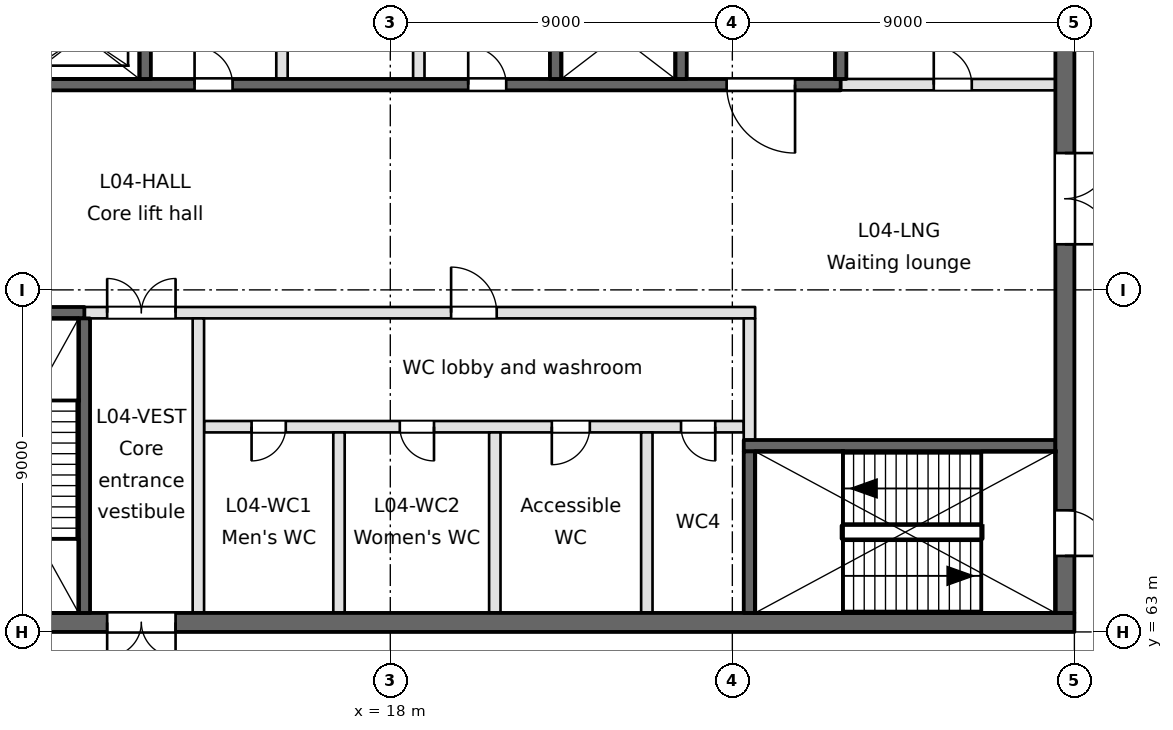
"""IFC4 building model, lengths in metres.
Left out: names, types, materials, properties, quantities, classifications, styles, units other than length and angle.
Written with IfcOpenShell. Run it as: python <this file> out.ifc"""

import sys

from ifc_helpers import new_model, si_unit, direction, frame, frame_2d, origin, place, context, subcontext, project, spatial, rectangle, extrude, element, fill, save


model = new_model("IFC4")
c1 = context("Model", 3, precision=1e-05, world=origin(), true_north=direction((0.0, 1.0)))
c2 = subcontext(c1, "Body", "Model", "MODEL_VIEW")
j1 = project(units=[si_unit("LENGTHUNIT", "METRE"), si_unit("PLANEANGLEUNIT", "RADIAN")], contexts=[c1])
p1 = place(None, origin())
s1 = spatial("IfcSite", under=j1, at=p1, CompositionType="ELEMENT")
p2 = place(p1, origin())
s2 = spatial("IfcBuilding", under=s1, at=p2, CompositionType="ELEMENT")
p3 = place(p2, frame((0.0, 0.0, 21.6)))
s3 = spatial("IfcBuildingStorey", under=s2, at=p3, CompositionType="ELEMENT", Elevation=21.6)
p4 = place(p3, frame((0.9, 63.25, -0.35), z_axis=(0.0, 0.0, 1.0), x_axis=(1.0, 0.0, 0.0)))
e1 = element("IfcWall", 1, at=p4, inside=s3, PredefinedType="SOLIDWALL", context=c2, shape_type="SweptSolid", body=[
    extrude(rectangle(XDim=35.1, YDim=0.5, at=frame_2d((17.55, 0.0))), origin(), (0.0, 0.0, 1.0), 4.8),
])
p5 = place(p4, frame((9.65, 0.0, 0.35)))
e2 = element("IfcOpeningElement", 2, at=p5, cuts=e1, PredefinedType="OPENING", context=c2, shape_type="SweptSolid", body=[
    extrude(rectangle(XDim=1.8, YDim=2.1, at=frame_2d((0.9, 1.05))), frame((0.0, 0.25, 0.0), z_axis=(0.0, -1.0, 0.0), x_axis=(1.0, 0.0, 0.0)), (0.0, 0.0, 1.0), 0.5),
])
p6 = place(p4, frame((1.55, 0.0, 0.35)))
e3 = element("IfcOpeningElement", 3, at=p6, cuts=e1, PredefinedType="OPENING", context=c2, shape_type="SweptSolid", body=[
    extrude(rectangle(XDim=1.2, YDim=2.1, at=frame_2d((0.6, 1.05))), frame((0.0, 0.25, 0.0), z_axis=(0.0, -1.0, 0.0), x_axis=(1.0, 0.0, 0.0)), (0.0, 0.0, 1.0), 0.5),
])
p7 = place(p4, frame((6.15, 0.0, 0.35)))
e4 = element("IfcOpeningElement", 4, at=p7, cuts=e1, PredefinedType="OPENING", context=c2, shape_type="SweptSolid", body=[
    extrude(rectangle(XDim=1.2, YDim=2.1, at=frame_2d((0.6, 1.05))), frame((0.0, 0.25, 0.0), z_axis=(0.0, -1.0, 0.0), x_axis=(1.0, 0.0, 0.0)), (0.0, 0.0, 1.0), 0.5),
])
p8 = place(p3, frame((27.3, 67.9, -0.35), z_axis=(0.0, 0.0, 1.0), x_axis=(1.0, 0.0, 0.0)))
e5 = element("IfcWall", 5, at=p8, inside=s3, PredefinedType="SOLIDWALL", context=c2, shape_type="SweptSolid", body=[
    extrude(rectangle(XDim=8.2, YDim=0.3, at=frame_2d((4.1, 0.0))), origin(), (0.0, 0.0, 1.0), 4.8),
])
p9 = place(p3, frame((13.1, 68.4, 0.0), z_axis=(0.0, 0.0, 1.0), x_axis=(1.0, 0.0, 0.0)))
e6 = element("IfcWall", 6, at=p9, inside=s3, PredefinedType="PARTITIONING", context=c2, shape_type="SweptSolid", body=[
    extrude(rectangle(XDim=14.2, YDim=0.3, at=frame_2d((7.1, 0.0))), origin(), (0.0, 0.0, 1.0), 4.45),
])
p10 = place(p9, frame((1.25, 0.0, 0.0)))
e7 = element("IfcOpeningElement", 7, at=p10, cuts=e6, PredefinedType="OPENING", context=c2, shape_type="SweptSolid", body=[
    extrude(rectangle(XDim=0.9, YDim=2.1, at=frame_2d((0.45, 1.05))), frame((0.0, 0.15, 0.0), z_axis=(0.0, -1.0, 0.0), x_axis=(1.0, 0.0, 0.0)), (0.0, 0.0, 1.0), 0.3),
])
p11 = place(p9, frame((5.15, 0.0, 0.0)))
e8 = element("IfcOpeningElement", 8, at=p11, cuts=e6, PredefinedType="OPENING", context=c2, shape_type="SweptSolid", body=[
    extrude(rectangle(XDim=0.9, YDim=2.1, at=frame_2d((0.45, 1.05))), frame((0.0, 0.15, 0.0), z_axis=(0.0, -1.0, 0.0), x_axis=(1.0, 0.0, 0.0)), (0.0, 0.0, 1.0), 0.3),
])
p12 = place(p9, frame((9.15, 0.0, 0.0)))
e9 = element("IfcOpeningElement", 9, at=p12, cuts=e6, PredefinedType="OPENING", context=c2, shape_type="SweptSolid", body=[
    extrude(rectangle(XDim=1.0, YDim=2.1, at=frame_2d((0.5, 1.05))), frame((0.0, 0.15, 0.0), z_axis=(0.0, -1.0, 0.0), x_axis=(1.0, 0.0, 0.0)), (0.0, 0.0, 1.0), 0.3),
])
p13 = place(p9, frame((12.55, 0.0, 0.0)))
e10 = element("IfcOpeningElement", 10, at=p13, cuts=e6, PredefinedType="OPENING", context=c2, shape_type="SweptSolid", body=[
    extrude(rectangle(XDim=0.9, YDim=2.1, at=frame_2d((0.45, 1.05))), frame((0.0, 0.15, 0.0), z_axis=(0.0, -1.0, 0.0), x_axis=(1.0, 0.0, 0.0)), (0.0, 0.0, 1.0), 0.3),
])
p14 = place(p3, frame((0.9, 71.4, -0.35), z_axis=(0.0, 0.0, 1.0), x_axis=(1.0, 0.0, 0.0)))
e11 = element("IfcWall", 11, at=p14, inside=s3, PredefinedType="SOLIDWALL", context=c2, shape_type="SweptSolid", body=[
    extrude(rectangle(XDim=9.05, YDim=0.3, at=frame_2d((4.525, 0.0))), origin(), (0.0, 0.0, 1.0), 4.8),
])
p15 = place(p3, frame((9.95, 71.4, 0.0), z_axis=(0.0, 0.0, 1.0), x_axis=(1.0, 0.0, 0.0)))
e12 = element("IfcWall", 12, at=p15, inside=s3, PredefinedType="PARTITIONING", context=c2, shape_type="SweptSolid", body=[
    extrude(rectangle(XDim=17.65, YDim=0.3, at=frame_2d((8.825, 0.0))), origin(), (0.0, 0.0, 1.0), 4.45),
])
p16 = place(p15, frame((0.6, 0.0, 0.0)))
e13 = element("IfcOpeningElement", 13, at=p16, cuts=e12, PredefinedType="OPENING", context=c2, shape_type="SweptSolid", body=[
    extrude(rectangle(XDim=1.8, YDim=2.1, at=frame_2d((0.9, 1.05))), frame((0.0, 0.15, 0.0), z_axis=(0.0, -1.0, 0.0), x_axis=(1.0, 0.0, 0.0)), (0.0, 0.0, 1.0), 0.3),
])
p17 = place(p15, frame((9.65, 0.0, 0.0)))
e14 = element("IfcOpeningElement", 14, at=p17, cuts=e12, PredefinedType="OPENING", context=c2, shape_type="SweptSolid", body=[
    extrude(rectangle(XDim=1.2, YDim=2.1, at=frame_2d((0.6, 1.05))), frame((0.0, 0.15, 0.0), z_axis=(0.0, -1.0, 0.0), x_axis=(1.0, 0.0, 0.0)), (0.0, 0.0, 1.0), 0.3),
])
p18 = place(p3, frame((0.9, 77.4, -0.35), z_axis=(0.0, 0.0, 1.0), x_axis=(1.0, 0.0, 0.0)))
e15 = element("IfcWall", 15, at=p18, inside=s3, PredefinedType="SOLIDWALL", context=c2, shape_type="SweptSolid", body=[
    extrude(rectangle(XDim=28.95, YDim=0.3, at=frame_2d((14.475, 0.0))), origin(), (0.0, 0.0, 1.0), 4.8),
])
p19 = place(p18, frame((4.35, 0.0, 0.35)))
e16 = element("IfcOpeningElement", 16, at=p19, cuts=e15, PredefinedType="OPENING", context=c2, shape_type="SweptSolid", body=[
    extrude(rectangle(XDim=1.8, YDim=2.1, at=frame_2d((0.9, 1.05))), frame((0.0, 0.15, 0.0), z_axis=(0.0, -1.0, 0.0), x_axis=(1.0, 0.0, 0.0)), (0.0, 0.0, 1.0), 0.3),
])
p20 = place(p18, frame((25.95, 0.0, 0.35)))
e17 = element("IfcOpeningElement", 17, at=p20, cuts=e15, PredefinedType="OPENING", context=c2, shape_type="SweptSolid", body=[
    extrude(rectangle(XDim=1.8, YDim=2.1, at=frame_2d((0.9, 1.05))), frame((0.0, 0.15, 0.0), z_axis=(0.0, -1.0, 0.0), x_axis=(1.0, 0.0, 0.0)), (0.0, 0.0, 1.0), 0.3),
])
p21 = place(p18, frame((11.95, 0.0, 0.35)))
e18 = element("IfcOpeningElement", 18, at=p21, cuts=e15, PredefinedType="OPENING", context=c2, shape_type="SweptSolid", body=[
    extrude(rectangle(XDim=1.0, YDim=2.1, at=frame_2d((0.5, 1.05))), frame((0.0, 0.15, 0.0), z_axis=(0.0, -1.0, 0.0), x_axis=(1.0, 0.0, 0.0)), (0.0, 0.0, 1.0), 0.3),
])
p22 = place(p18, frame((19.15, 0.0, 0.35)))
e19 = element("IfcOpeningElement", 19, at=p22, cuts=e15, PredefinedType="OPENING", context=c2, shape_type="SweptSolid", body=[
    extrude(rectangle(XDim=1.0, YDim=2.1, at=frame_2d((0.5, 1.05))), frame((0.0, 0.15, 0.0), z_axis=(0.0, -1.0, 0.0), x_axis=(1.0, 0.0, 0.0)), (0.0, 0.0, 1.0), 0.3),
])
p23 = place(p3, frame((29.85, 77.4, 0.0), z_axis=(0.0, 0.0, 1.0), x_axis=(1.0, 0.0, 0.0)))
e20 = element("IfcWall", 20, at=p23, inside=s3, PredefinedType="PARTITIONING", context=c2, shape_type="SweptSolid", body=[
    extrude(rectangle(XDim=5.65, YDim=0.3, at=frame_2d((2.825, 0.0))), origin(), (0.0, 0.0, 1.0), 4.45),
])
p24 = place(p23, frame((2.45, 0.0, 0.0)))
e21 = element("IfcOpeningElement", 21, at=p24, cuts=e20, PredefinedType="OPENING", context=c2, shape_type="SweptSolid", body=[
    extrude(rectangle(XDim=1.0, YDim=2.1, at=frame_2d((0.5, 1.05))), frame((0.0, 0.15, 0.0), z_axis=(0.0, -1.0, 0.0), x_axis=(1.0, 0.0, 0.0)), (0.0, 0.0, 1.0), 0.3),
])
p25 = place(p3, frame((9.95, 63.5, -0.35), z_axis=(0.0, 0.0, 1.0), x_axis=(0.0, 1.0, 0.0)))
e22 = element("IfcWall", 22, at=p25, inside=s3, PredefinedType="SOLIDWALL", context=c2, shape_type="SweptSolid", body=[
    extrude(rectangle(XDim=7.75, YDim=0.3, at=frame_2d((3.875, 0.0))), origin(), (0.0, 0.0, 1.0), 4.8),
])
p26 = place(p3, frame((11.55, 77.55, -0.35), z_axis=(0.0, 0.0, 1.0), x_axis=(0.0, 1.0, 0.0)))
e23 = element("IfcWall", 23, at=p26, inside=s3, PredefinedType="SOLIDWALL", context=c2, shape_type="SweptSolid", body=[
    extrude(rectangle(XDim=10.1, YDim=0.3, at=frame_2d((5.05, 0.0))), origin(), (0.0, 0.0, 1.0), 4.8),
])
p27 = place(p3, frame((12.95, 63.5, 0.0), z_axis=(0.0, 0.0, 1.0), x_axis=(0.0, 1.0, 0.0)))
e24 = element("IfcWall", 24, at=p27, inside=s3, PredefinedType="PARTITIONING", context=c2, shape_type="SweptSolid", body=[
    extrude(rectangle(XDim=7.75, YDim=0.3, at=frame_2d((3.875, 0.0))), origin(), (0.0, 0.0, 1.0), 4.45),
])
p28 = place(p3, frame((15.15, 77.55, 0.0), z_axis=(0.0, 0.0, 1.0), x_axis=(0.0, 1.0, 0.0)))
e25 = element("IfcWall", 25, at=p28, inside=s3, PredefinedType="PARTITIONING", context=c2, shape_type="SweptSolid", body=[
    extrude(rectangle(XDim=12.95, YDim=0.3, at=frame_2d((6.475, 0.0))), origin(), (0.0, 0.0, 1.0), 4.45),
])
p29 = place(p3, frame((16.65, 63.5, 0.0), z_axis=(0.0, 0.0, 1.0), x_axis=(0.0, 1.0, 0.0)))
e26 = element("IfcWall", 26, at=p29, inside=s3, PredefinedType="PARTITIONING", context=c2, shape_type="SweptSolid", body=[
    extrude(rectangle(XDim=4.75, YDim=0.3, at=frame_2d((2.375, 0.0))), origin(), (0.0, 0.0, 1.0), 4.45),
])
p30 = place(p3, frame((18.75, 77.55, 0.0), z_axis=(0.0, 0.0, 1.0), x_axis=(0.0, 1.0, 0.0)))
e27 = element("IfcWall", 27, at=p30, inside=s3, PredefinedType="PARTITIONING", context=c2, shape_type="SweptSolid", body=[
    extrude(rectangle(XDim=12.95, YDim=0.3, at=frame_2d((6.475, 0.0))), origin(), (0.0, 0.0, 1.0), 4.45),
])
p31 = place(p3, frame((20.75, 63.5, 0.0), z_axis=(0.0, 0.0, 1.0), x_axis=(0.0, 1.0, 0.0)))
e28 = element("IfcWall", 28, at=p31, inside=s3, PredefinedType="PARTITIONING", context=c2, shape_type="SweptSolid", body=[
    extrude(rectangle(XDim=4.75, YDim=0.3, at=frame_2d((2.375, 0.0))), origin(), (0.0, 0.0, 1.0), 4.45),
])
p32 = place(p3, frame((22.35, 77.55, -0.35), z_axis=(0.0, 0.0, 1.0), x_axis=(0.0, 1.0, 0.0)))
e29 = element("IfcWall", 29, at=p32, inside=s3, PredefinedType="SOLIDWALL", context=c2, shape_type="SweptSolid", body=[
    extrude(rectangle(XDim=10.1, YDim=0.3, at=frame_2d((5.05, 0.0))), origin(), (0.0, 0.0, 1.0), 4.8),
])
p33 = place(p3, frame((24.75, 63.5, 0.0), z_axis=(0.0, 0.0, 1.0), x_axis=(0.0, 1.0, 0.0)))
e30 = element("IfcWall", 30, at=p33, inside=s3, PredefinedType="PARTITIONING", context=c2, shape_type="SweptSolid", body=[
    extrude(rectangle(XDim=4.75, YDim=0.3, at=frame_2d((2.375, 0.0))), origin(), (0.0, 0.0, 1.0), 4.45),
])
p34 = place(p3, frame((25.65, 77.55, -0.35), z_axis=(0.0, 0.0, 1.0), x_axis=(0.0, 1.0, 0.0)))
e31 = element("IfcWall", 31, at=p34, inside=s3, PredefinedType="SOLIDWALL", context=c2, shape_type="SweptSolid", body=[
    extrude(rectangle(XDim=10.1, YDim=0.3, at=frame_2d((5.05, 0.0))), origin(), (0.0, 0.0, 1.0), 4.8),
])
p35 = place(p3, frame((27.45, 63.5, -0.35), z_axis=(0.0, 0.0, 1.0), x_axis=(0.0, 1.0, 0.0)))
e32 = element("IfcWall", 32, at=p35, inside=s3, PredefinedType="SOLIDWALL", context=c2, shape_type="SweptSolid", body=[
    extrude(rectangle(XDim=4.25, YDim=0.3, at=frame_2d((2.125, 0.0))), origin(), (0.0, 0.0, 1.0), 4.8),
])
p36 = place(p3, frame((27.45, 68.05, 0.0), z_axis=(0.0, 0.0, 1.0), x_axis=(0.0, 1.0, 0.0)))
e33 = element("IfcWall", 33, at=p36, inside=s3, PredefinedType="PARTITIONING", context=c2, shape_type="SweptSolid", body=[
    extrude(rectangle(XDim=3.2, YDim=0.3, at=frame_2d((1.6, 0.0))), origin(), (0.0, 0.0, 1.0), 4.45),
])
p37 = place(p3, frame((29.85, 77.55, -0.35), z_axis=(0.0, 0.0, 1.0), x_axis=(0.0, 1.0, 0.0)))
e34 = element("IfcWall", 34, at=p37, inside=s3, PredefinedType="SOLIDWALL", context=c2, shape_type="SweptSolid", body=[
    extrude(rectangle(XDim=10.1, YDim=0.3, at=frame_2d((5.05, 0.0))), origin(), (0.0, 0.0, 1.0), 4.8),
])
p38 = place(p3, frame((35.75, 63.5, -0.35), z_axis=(0.0, 0.0, 1.0), x_axis=(0.0, 1.0, 0.0)))
e35 = element("IfcWall", 35, at=p38, inside=s3, PredefinedType="SOLIDWALL", context=c2, shape_type="SweptSolid", body=[
    extrude(rectangle(XDim=34.6, YDim=0.5, at=frame_2d((17.3, 0.0))), origin(), (0.0, 0.0, 1.0), 4.8),
])
p39 = place(p38, frame((9.7, 0.0, 0.35)))
e36 = element("IfcOpeningElement", 36, at=p39, cuts=e35, PredefinedType="OPENING", context=c2, shape_type="SweptSolid", body=[
    extrude(rectangle(XDim=2.4, YDim=2.1, at=frame_2d((1.2, 1.05))), frame((0.0, 0.25, 0.0), z_axis=(0.0, -1.0, 0.0), x_axis=(1.0, 0.0, 0.0)), (0.0, 0.0, 1.0), 0.5),
])
p40 = place(p38, frame((27.9, 0.0, 0.35)))
e37 = element("IfcOpeningElement", 37, at=p40, cuts=e35, PredefinedType="OPENING", context=c2, shape_type="SweptSolid", body=[
    extrude(rectangle(XDim=1.5, YDim=2.1, at=frame_2d((0.75, 1.05))), frame((0.0, 0.25, 0.0), z_axis=(0.0, -1.0, 0.0), x_axis=(1.0, 0.0, 0.0)), (0.0, 0.0, 1.0), 0.5),
])
p41 = place(p38, frame((1.5, 0.0, 0.35)))
e38 = element("IfcOpeningElement", 38, at=p41, cuts=e35, PredefinedType="OPENING", context=c2, shape_type="SweptSolid", body=[
    extrude(rectangle(XDim=1.2, YDim=2.1, at=frame_2d((0.6, 1.05))), frame((0.0, 0.25, 0.0), z_axis=(0.0, -1.0, 0.0), x_axis=(1.0, 0.0, 0.0)), (0.0, 0.0, 1.0), 0.5),
])
p42 = place(p20, frame((1.8, 0.0, 0.0), z_axis=(0.0, 0.0, 1.0), x_axis=(-1.0, 0.0, 0.0)))
e39 = element("IfcDoor", 39, at=p42, inside=s3, OperationType="SINGLE_SWING_LEFT", PredefinedType="DOOR", context=c2, shape_type="SweptSolid", body=[
    extrude(rectangle(XDim=1.8, YDim=2.1, at=frame_2d((0.9, 1.05))), frame((0.0, 0.025, 0.0), z_axis=(0.0, -1.0, 0.0), x_axis=(1.0, 0.0, 0.0)), (0.0, 0.0, 1.0), 0.05),
])
fill(e17, e39)
p43 = place(p39, frame((2.4, 0.0, 0.0), z_axis=(0.0, 0.0, 1.0), x_axis=(-1.0, 0.0, 0.0)))
e40 = element("IfcDoor", 40, at=p43, inside=s3, OperationType="DOUBLE_DOOR_SINGLE_SWING", PredefinedType="DOOR", context=c2, shape_type="SweptSolid", body=[
    extrude(rectangle(XDim=2.4, YDim=2.1, at=frame_2d((1.2, 1.05))), frame((0.0, 0.025, 0.0), z_axis=(0.0, -1.0, 0.0), x_axis=(1.0, 0.0, 0.0)), (0.0, 0.0, 1.0), 0.05),
])
fill(e36, e40)
p44 = place(p5, frame((1.8, 0.0, 0.0), z_axis=(0.0, 0.0, 1.0), x_axis=(-1.0, 0.0, 0.0)))
e41 = element("IfcDoor", 41, at=p44, inside=s3, OperationType="DOUBLE_DOOR_SINGLE_SWING", PredefinedType="DOOR", context=c2, shape_type="SweptSolid", body=[
    extrude(rectangle(XDim=1.8, YDim=2.1, at=frame_2d((0.9, 1.05))), frame((0.0, 0.025, 0.0), z_axis=(0.0, -1.0, 0.0), x_axis=(1.0, 0.0, 0.0)), (0.0, 0.0, 1.0), 0.05),
])
fill(e2, e41)
p45 = place(p16, origin())
e42 = element("IfcDoor", 42, at=p45, inside=s3, OperationType="DOUBLE_DOOR_SINGLE_SWING", PredefinedType="DOOR", context=c2, shape_type="SweptSolid", body=[
    extrude(rectangle(XDim=1.8, YDim=2.1, at=frame_2d((0.9, 1.05))), frame((0.0, 0.025, 0.0), z_axis=(0.0, -1.0, 0.0), x_axis=(1.0, 0.0, 0.0)), (0.0, 0.0, 1.0), 0.05),
])
fill(e13, e42)
p46 = place(p10, frame((0.9, 0.0, 0.0), z_axis=(0.0, 0.0, 1.0), x_axis=(-1.0, 0.0, 0.0)))
e43 = element("IfcDoor", 43, at=p46, inside=s3, OperationType="SINGLE_SWING_RIGHT", PredefinedType="DOOR", context=c2, shape_type="SweptSolid", body=[
    extrude(rectangle(XDim=0.9, YDim=2.1, at=frame_2d((0.45, 1.05))), frame((0.0, 0.025, 0.0), z_axis=(0.0, -1.0, 0.0), x_axis=(1.0, 0.0, 0.0)), (0.0, 0.0, 1.0), 0.05),
])
fill(e7, e43)
p47 = place(p11, frame((0.9, 0.0, 0.0), z_axis=(0.0, 0.0, 1.0), x_axis=(-1.0, 0.0, 0.0)))
e44 = element("IfcDoor", 44, at=p47, inside=s3, OperationType="SINGLE_SWING_LEFT", PredefinedType="DOOR", context=c2, shape_type="SweptSolid", body=[
    extrude(rectangle(XDim=0.9, YDim=2.1, at=frame_2d((0.45, 1.05))), frame((0.0, 0.025, 0.0), z_axis=(0.0, -1.0, 0.0), x_axis=(1.0, 0.0, 0.0)), (0.0, 0.0, 1.0), 0.05),
])
fill(e8, e44)
p48 = place(p12, frame((1.0, 0.0, 0.0), z_axis=(0.0, 0.0, 1.0), x_axis=(-1.0, 0.0, 0.0)))
e45 = element("IfcDoor", 45, at=p48, inside=s3, OperationType="SINGLE_SWING_RIGHT", PredefinedType="DOOR", context=c2, shape_type="SweptSolid", body=[
    extrude(rectangle(XDim=1.0, YDim=2.1, at=frame_2d((0.5, 1.05))), frame((0.0, 0.025, 0.0), z_axis=(0.0, -1.0, 0.0), x_axis=(1.0, 0.0, 0.0)), (0.0, 0.0, 1.0), 0.05),
])
fill(e9, e45)
p49 = place(p13, frame((0.9, 0.0, 0.0), z_axis=(0.0, 0.0, 1.0), x_axis=(-1.0, 0.0, 0.0)))
e46 = element("IfcDoor", 46, at=p49, inside=s3, OperationType="SINGLE_SWING_LEFT", PredefinedType="DOOR", context=c2, shape_type="SweptSolid", body=[
    extrude(rectangle(XDim=0.9, YDim=2.1, at=frame_2d((0.45, 1.05))), frame((0.0, 0.025, 0.0), z_axis=(0.0, -1.0, 0.0), x_axis=(1.0, 0.0, 0.0)), (0.0, 0.0, 1.0), 0.05),
])
fill(e10, e46)
p50 = place(p17, origin())
e47 = element("IfcDoor", 47, at=p50, inside=s3, OperationType="SINGLE_SWING_LEFT", PredefinedType="DOOR", context=c2, shape_type="SweptSolid", body=[
    extrude(rectangle(XDim=1.2, YDim=2.1, at=frame_2d((0.6, 1.05))), frame((0.0, 0.025, 0.0), z_axis=(0.0, -1.0, 0.0), x_axis=(1.0, 0.0, 0.0)), (0.0, 0.0, 1.0), 0.05),
])
fill(e14, e47)
p51 = place(p41, frame((1.2, 0.0, 0.0), z_axis=(0.0, 0.0, 1.0), x_axis=(-1.0, 0.0, 0.0)))
e48 = element("IfcDoor", 48, at=p51, inside=s3, OperationType="SINGLE_SWING_RIGHT", PredefinedType="DOOR", context=c2, shape_type="SweptSolid", body=[
    extrude(rectangle(XDim=1.2, YDim=2.1, at=frame_2d((0.6, 1.05))), frame((0.0, 0.025, 0.0), z_axis=(0.0, -1.0, 0.0), x_axis=(1.0, 0.0, 0.0)), (0.0, 0.0, 1.0), 0.05),
])
fill(e38, e48)
p52 = place(p21, origin())
e49 = element("IfcDoor", 49, at=p52, inside=s3, OperationType="SINGLE_SWING_LEFT", PredefinedType="DOOR", context=c2, shape_type="SweptSolid", body=[
    extrude(rectangle(XDim=1.0, YDim=2.1, at=frame_2d((0.5, 1.05))), frame((0.0, 0.025, 0.0), z_axis=(0.0, -1.0, 0.0), x_axis=(1.0, 0.0, 0.0)), (0.0, 0.0, 1.0), 0.05),
])
fill(e18, e49)
p53 = place(p22, origin())
e50 = element("IfcDoor", 50, at=p53, inside=s3, OperationType="SINGLE_SWING_LEFT", PredefinedType="DOOR", context=c2, shape_type="SweptSolid", body=[
    extrude(rectangle(XDim=1.0, YDim=2.1, at=frame_2d((0.5, 1.05))), frame((0.0, 0.025, 0.0), z_axis=(0.0, -1.0, 0.0), x_axis=(1.0, 0.0, 0.0)), (0.0, 0.0, 1.0), 0.05),
])
fill(e19, e50)
p54 = place(p24, origin())
e51 = element("IfcDoor", 51, at=p54, inside=s3, OperationType="SINGLE_SWING_LEFT", PredefinedType="DOOR", context=c2, shape_type="SweptSolid", body=[
    extrude(rectangle(XDim=1.0, YDim=2.1, at=frame_2d((0.5, 1.05))), frame((0.0, 0.025, 0.0), z_axis=(0.0, -1.0, 0.0), x_axis=(1.0, 0.0, 0.0)), (0.0, 0.0, 1.0), 0.05),
])
fill(e21, e51)
save(model, sys.argv[1])
